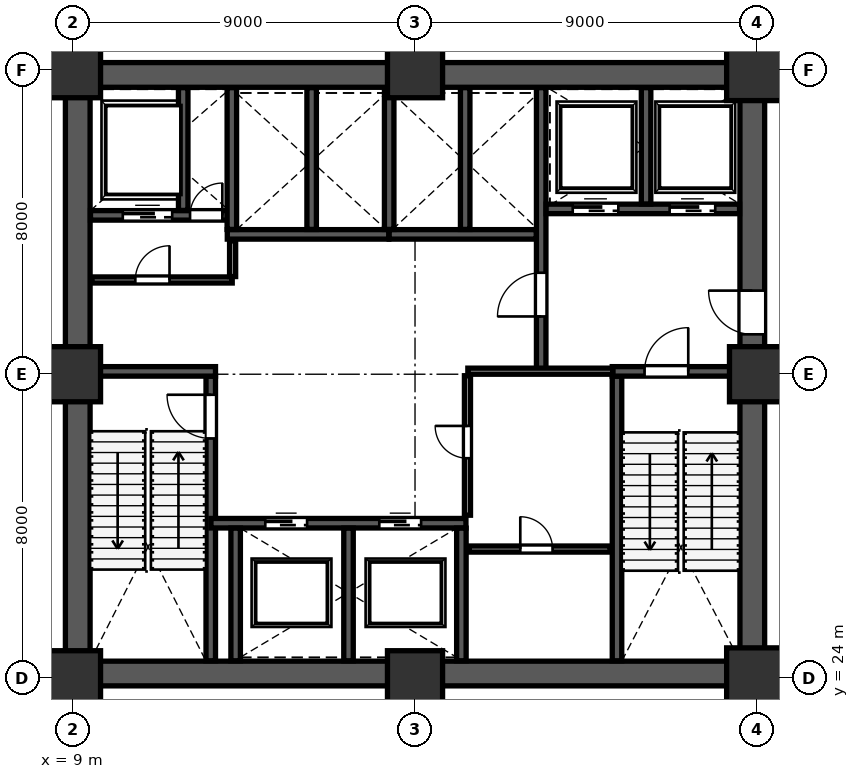
"""IFC4 building model, lengths in metres.
Left out: names, types, materials, properties, quantities, classifications, styles, units other than length and angle.
Written with IfcOpenShell. Run it as: python <this file> out.ifc"""

import sys

from ifc_helpers import new_model, si_unit, direction, frame, frame_2d, origin, origin_2d, place, context, subcontext, project, spatial, rectangle, extrude, source, transform, mapped, element, fill, save


model = new_model("IFC4")
c1 = context("Model", 3, precision=1e-05, world=origin(), true_north=direction((0.0, 1.0)))
c2 = subcontext(c1, "Body", "Model", "MODEL_VIEW")
j1 = project(units=[si_unit("LENGTHUNIT", "METRE"), si_unit("PLANEANGLEUNIT", "RADIAN")], contexts=[c1])
p1 = place(None, origin())
s1 = spatial("IfcSite", under=j1, at=p1, CompositionType="ELEMENT")
p2 = place(p1, origin())
s2 = spatial("IfcBuilding", under=s1, at=p2, CompositionType="ELEMENT")
p3 = place(p2, frame((0.0, 0.0, 17.4)))
s3 = spatial("IfcBuildingStorey", under=s2, at=p3, CompositionType="ELEMENT", Elevation=17.4)
m1 = source(origin(), c2, "Body", "SweptSolid", [
    extrude(rectangle(XDim=1.45, YDim=1.45, at=origin_2d()), origin(), (0.0, 0.0, 1.0), 4.799),
])
p4 = place(p3, frame((9.0, 24.0, 0.001), z_axis=(0.0, 0.0, 1.0), x_axis=(1.0, 0.0, 0.0)))
e1 = element("IfcColumn", 1, at=p4, inside=s3, PredefinedType="COLUMN", context=c2, shape_type="MappedRepresentation", body=[
    mapped(m1, transform((0.0, 0.0, 0.0), scale=1.0)),
])
m2 = source(origin(), c2, "Body", "SweptSolid", [
    extrude(rectangle(XDim=1.45, YDim=1.45, at=origin_2d()), origin(), (0.0, 0.0, 1.0), 4.799),
])
for number, where, z_axis, x_axis in (
    (2, (9.0, 32.0, 0.001), (0.0, 0.0, 1.0), (1.0, 0.0, 0.0)),
    (3, (9.0, 40.0, 0.001), (0.0, 0.0, 1.0), (1.0, 0.0, 0.0)),
):
    element("IfcColumn", number, at=place(p3, frame(where, z_axis=z_axis, x_axis=x_axis)), inside=s3, PredefinedType="COLUMN", context=c2, shape_type="MappedRepresentation", body=[
        mapped(m2, transform((0.0, 0.0, 0.0), scale=1.0)),
    ])
p5 = place(p3, frame((18.0, 24.0, 0.001), z_axis=(0.0, 0.0, 1.0), x_axis=(1.0, 0.0, 0.0)))
e4 = element("IfcColumn", 4, at=p5, inside=s3, PredefinedType="COLUMN", context=c2, shape_type="MappedRepresentation", body=[
    mapped(m1, transform((0.0, 0.0, 0.0), scale=1.0)),
])
p6 = place(p3, frame((18.0, 40.0, 0.001), z_axis=(0.0, 0.0, 1.0), x_axis=(1.0, 0.0, 0.0)))
e5 = element("IfcColumn", 5, at=p6, inside=s3, PredefinedType="COLUMN", context=c2, shape_type="MappedRepresentation", body=[
    mapped(m2, transform((0.0, 0.0, 0.0), scale=1.0)),
])
m3 = source(origin(), c2, "Body", "SweptSolid", [
    extrude(rectangle(XDim=1.6, YDim=1.6, at=origin_2d()), origin(), (0.0, 0.0, 1.0), 4.799),
])
p7 = place(p3, frame((27.0, 24.0, 0.001), z_axis=(0.0, 0.0, 1.0), x_axis=(1.0, 0.0, 0.0)))
e6 = element("IfcColumn", 6, at=p7, inside=s3, PredefinedType="COLUMN", context=c2, shape_type="MappedRepresentation", body=[
    mapped(m3, transform((0.0, 0.0, 0.0), scale=1.0)),
])
p8 = place(p3, frame((27.0, 32.0, 0.001), z_axis=(0.0, 0.0, 1.0), x_axis=(1.0, 0.0, 0.0)))
e7 = element("IfcColumn", 7, at=p8, inside=s3, PredefinedType="COLUMN", context=c2, shape_type="MappedRepresentation", body=[
    mapped(m2, transform((0.0, 0.0, 0.0), scale=1.0)),
])
m4 = source(origin(), c2, "Body", "SweptSolid", [
    extrude(rectangle(XDim=1.6, YDim=1.6, at=origin_2d()), origin(), (0.0, 0.0, 1.0), 4.799),
])
p9 = place(p3, frame((27.0, 40.0, 0.001), z_axis=(0.0, 0.0, 1.0), x_axis=(1.0, 0.0, 0.0)))
e8 = element("IfcColumn", 8, at=p9, inside=s3, PredefinedType="COLUMN", context=c2, shape_type="MappedRepresentation", body=[
    mapped(m4, transform((0.0, 0.0, 0.0), scale=1.0)),
])
p10 = place(p3, frame((9.125, 24.45, 0.0), z_axis=(0.0, 0.0, 1.0), x_axis=(0.0, 1.0, 0.0)))
e9 = element("IfcWall", 9, at=p10, inside=s3, PredefinedType="SHEAR", context=c2, shape_type="SweptSolid", body=[
    extrude(rectangle(XDim=15.1, YDim=0.65, at=frame_2d((7.55, 0.0))), origin(), (0.0, 0.0, 1.0), 4.54),
])
p11 = place(p3, frame((26.875, 24.45, 0.0), z_axis=(0.0, 0.0, 1.0), x_axis=(0.0, 1.0, 0.0)))
e10 = element("IfcWall", 10, at=p11, inside=s3, PredefinedType="SHEAR", context=c2, shape_type="SweptSolid", body=[
    extrude(rectangle(XDim=15.1, YDim=0.65, at=frame_2d((7.55, 0.0))), origin(), (0.0, 0.0, 1.0), 4.54),
])
p12 = place(p11, frame((8.6, 0.0, 0.0)))
e11 = element("IfcOpeningElement", 11, at=p12, cuts=e10, PredefinedType="OPENING", context=c2, shape_type="SweptSolid", body=[
    extrude(rectangle(XDim=1.15, YDim=2.2, at=frame_2d((0.575, 1.1))), frame((0.0, 0.335, 0.0), z_axis=(0.0, -1.0, 0.0), x_axis=(1.0, 0.0, 0.0)), (0.0, 0.0, 1.0), 0.67),
])
for number, where, z_axis, x_axis in (
    (12, (8.8, 24.125, 0.0), (0.0, 0.0, 1.0), (1.0, 0.0, 0.0)),
    (13, (8.8, 39.875, 0.0), (0.0, 0.0, 1.0), (1.0, 0.0, 0.0)),
):
    element("IfcWall", number, at=place(p3, frame(where, z_axis=z_axis, x_axis=x_axis)), inside=s3, PredefinedType="SHEAR", context=c2, shape_type="SweptSolid", body=[
        extrude(rectangle(XDim=18.4, YDim=0.65, at=frame_2d((9.2, 0.0))), origin(), (0.0, 0.0, 1.0), 4.54),
    ])
p13 = place(p3, frame((12.625, 24.46, 0.0), z_axis=(0.0, 0.0, 1.0), x_axis=(0.0, 1.0, 0.0)))
e14 = element("IfcWall", 14, at=p13, inside=s3, PredefinedType="SHEAR", context=c2, shape_type="SweptSolid", body=[
    extrude(rectangle(XDim=7.49, YDim=0.25, at=frame_2d((3.745, 0.0))), origin(), (0.0, 0.0, 1.0), 4.54),
])
p14 = place(p13, frame((5.85, 0.0, 0.0)))
e15 = element("IfcOpeningElement", 15, at=p14, cuts=e14, PredefinedType="OPENING", context=c2, shape_type="SweptSolid", body=[
    extrude(rectangle(XDim=1.15, YDim=2.2, at=frame_2d((0.575, 1.1))), frame((0.0, 0.135, 0.0), z_axis=(0.0, -1.0, 0.0), x_axis=(1.0, 0.0, 0.0)), (0.0, 0.0, 1.0), 0.27),
])
p15 = place(p3, frame((9.46, 32.075, 0.0), z_axis=(0.0, 0.0, 1.0), x_axis=(1.0, 0.0, 0.0)))
e16 = element("IfcWall", 16, at=p15, inside=s3, PredefinedType="SHEAR", context=c2, shape_type="SweptSolid", body=[
    extrude(rectangle(XDim=3.29, YDim=0.25, at=frame_2d((1.645, 0.0))), origin(), (0.0, 0.0, 1.0), 4.54),
])
p16 = place(p3, frame((23.315, 24.46, 0.0), z_axis=(0.0, 0.0, 1.0), x_axis=(0.0, 1.0, 0.0)))
e17 = element("IfcWall", 17, at=p16, inside=s3, PredefinedType="SHEAR", context=c2, shape_type="SweptSolid", body=[
    extrude(rectangle(XDim=7.49, YDim=0.25, at=frame_2d((3.745, 0.0))), origin(), (0.0, 0.0, 1.0), 4.54),
])
p17 = place(p3, frame((23.19, 32.075, 0.0), z_axis=(0.0, 0.0, 1.0), x_axis=(1.0, 0.0, 0.0)))
e18 = element("IfcWall", 18, at=p17, inside=s3, PredefinedType="SHEAR", context=c2, shape_type="SweptSolid", body=[
    extrude(rectangle(XDim=3.35, YDim=0.25, at=frame_2d((1.675, 0.0))), origin(), (0.0, 0.0, 1.0), 4.54),
])
p18 = place(p17, frame((0.85, 0.0, 0.0)))
e19 = element("IfcOpeningElement", 19, at=p18, cuts=e18, PredefinedType="OPENING", context=c2, shape_type="SweptSolid", body=[
    extrude(rectangle(XDim=1.15, YDim=2.2, at=frame_2d((0.575, 1.1))), frame((0.0, 0.135, 0.0), z_axis=(0.0, -1.0, 0.0), x_axis=(1.0, 0.0, 0.0)), (0.0, 0.0, 1.0), 0.27),
])
p19 = place(p3, frame((21.32, 32.12, 0.0), z_axis=(0.0, 0.0, 1.0), x_axis=(0.0, 1.0, 0.0)))
e20 = element("IfcWall", 20, at=p19, inside=s3, PredefinedType="SHEAR", context=c2, shape_type="SweptSolid", body=[
    extrude(rectangle(XDim=7.42, YDim=0.25, at=frame_2d((3.71, 0.0))), origin(), (0.0, 0.0, 1.0), 4.54),
])
p20 = place(p19, frame((1.4, 0.0, 0.0)))
e21 = element("IfcOpeningElement", 21, at=p20, cuts=e20, PredefinedType="OPENING", context=c2, shape_type="SweptSolid", body=[
    extrude(rectangle(XDim=1.15, YDim=2.2, at=frame_2d((0.575, 1.1))), frame((0.0, 0.135, 0.0), z_axis=(0.0, -1.0, 0.0), x_axis=(1.0, 0.0, 0.0)), (0.0, 0.0, 1.0), 0.27),
])
p21 = place(p3, frame((9.46, 36.18, 0.0), z_axis=(0.0, 0.0, 1.0), x_axis=(1.0, 0.0, 0.0)))
e22 = element("IfcWall", 22, at=p21, inside=s3, PredefinedType="SHEAR", context=c2, shape_type="SweptSolid", body=[
    extrude(rectangle(XDim=3.79, YDim=0.25, at=frame_2d((1.895, 0.0))), origin(), (0.0, 0.0, 1.0), 4.54),
])
p22 = place(p21, frame((2.62, 0.0, 0.0)))
e23 = element("IfcOpeningElement", 23, at=p22, cuts=e22, PredefinedType="OPENING", context=c2, shape_type="SweptSolid", body=[
    extrude(rectangle(XDim=0.85, YDim=2.1, at=frame_2d((0.425, 1.05))), frame((0.0, 0.135, 0.0), z_axis=(0.0, -1.0, 0.0), x_axis=(1.0, 0.0, 0.0)), (0.0, 0.0, 1.0), 0.27),
])
p23 = place(p21, frame((0.85, 0.0, 0.0)))
e24 = element("IfcOpeningElement", 24, at=p23, cuts=e22, PredefinedType="OPENING", context=c2, shape_type="SweptSolid", body=[
    extrude(rectangle(XDim=1.3, YDim=2.25, at=frame_2d((0.65, 1.125))), frame((0.0, 0.135, 0.0), z_axis=(0.0, -1.0, 0.0), x_axis=(1.0, 0.0, 0.0)), (0.0, 0.0, 1.0), 0.27),
])
p24 = place(p3, frame((11.9, 36.31, 0.0), z_axis=(0.0, 0.0, 1.0), x_axis=(0.0, 1.0, 0.0)))
e25 = element("IfcWall", 25, at=p24, inside=s3, PredefinedType="SHEAR", context=c2, shape_type="SweptSolid", body=[
    extrude(rectangle(XDim=3.23, YDim=0.25, at=frame_2d((1.615, 0.0))), origin(), (0.0, 0.0, 1.0), 4.54),
])
p25 = place(p3, frame((21.45, 36.35, 0.0), z_axis=(0.0, 0.0, 1.0), x_axis=(1.0, 0.0, 0.0)))
e26 = element("IfcWall", 26, at=p25, inside=s3, PredefinedType="SHEAR", context=c2, shape_type="SweptSolid", body=[
    extrude(rectangle(XDim=5.09, YDim=0.25, at=frame_2d((2.545, 0.0))), origin(), (0.0, 0.0, 1.0), 4.54),
])
p26 = place(p25, frame((0.7, 0.0, 0.0)))
e27 = element("IfcOpeningElement", 27, at=p26, cuts=e26, PredefinedType="OPENING", context=c2, shape_type="SweptSolid", body=[
    extrude(rectangle(XDim=1.2, YDim=2.2, at=frame_2d((0.6, 1.1))), frame((0.0, 0.135, 0.0), z_axis=(0.0, -1.0, 0.0), x_axis=(1.0, 0.0, 0.0)), (0.0, 0.0, 1.0), 0.27),
])
p27 = place(p25, frame((3.25, 0.0, 0.0)))
e28 = element("IfcOpeningElement", 28, at=p27, cuts=e26, PredefinedType="OPENING", context=c2, shape_type="SweptSolid", body=[
    extrude(rectangle(XDim=1.2, YDim=2.2, at=frame_2d((0.6, 1.1))), frame((0.0, 0.135, 0.0), z_axis=(0.0, -1.0, 0.0), x_axis=(1.0, 0.0, 0.0)), (0.0, 0.0, 1.0), 0.27),
])
p28 = place(p3, frame((24.08, 36.48, 0.0), z_axis=(0.0, 0.0, 1.0), x_axis=(0.0, 1.0, 0.0)))
e29 = element("IfcWall", 29, at=p28, inside=s3, PredefinedType="SHEAR", context=c2, shape_type="SweptSolid", body=[
    extrude(rectangle(XDim=3.06, YDim=0.25, at=frame_2d((1.53, 0.0))), origin(), (0.0, 0.0, 1.0), 4.54),
])
p29 = place(p3, frame((12.63, 28.08, 0.0), z_axis=(0.0, 0.0, 1.0), x_axis=(1.0, 0.0, 0.0)))
e30 = element("IfcWall", 30, at=p29, inside=s3, PredefinedType="SHEAR", context=c2, shape_type="SweptSolid", body=[
    extrude(rectangle(XDim=6.71, YDim=0.25, at=frame_2d((3.355, 0.0))), origin(), (0.0, 0.0, 1.0), 4.54),
])
p30 = place(p29, frame((1.43, 0.0, 0.0)))
e31 = element("IfcOpeningElement", 31, at=p30, cuts=e30, PredefinedType="OPENING", context=c2, shape_type="SweptSolid", body=[
    extrude(rectangle(XDim=1.1, YDim=2.2, at=frame_2d((0.55, 1.1))), frame((0.0, 0.135, 0.0), z_axis=(0.0, -1.0, 0.0), x_axis=(1.0, 0.0, 0.0)), (0.0, 0.0, 1.0), 0.27),
])
p31 = place(p29, frame((4.43, 0.0, 0.0)))
e32 = element("IfcOpeningElement", 32, at=p31, cuts=e30, PredefinedType="OPENING", context=c2, shape_type="SweptSolid", body=[
    extrude(rectangle(XDim=1.1, YDim=2.2, at=frame_2d((0.55, 1.1))), frame((0.0, 0.135, 0.0), z_axis=(0.0, -1.0, 0.0), x_axis=(1.0, 0.0, 0.0)), (0.0, 0.0, 1.0), 0.27),
])
for number, where, z_axis, x_axis in (
    (33, (13.28, 24.46, 0.0), (0.0, 0.0, 1.0), (0.0, 1.0, 0.0)),
    (34, (16.25, 24.46, 0.0), (0.0, 0.0, 1.0), (0.0, 1.0, 0.0)),
    (35, (19.22, 24.46, 0.0), (0.0, 0.0, 1.0), (0.0, 1.0, 0.0)),
):
    element("IfcWall", number, at=place(p3, frame(where, z_axis=z_axis, x_axis=x_axis)), inside=s3, PredefinedType="SHEAR", context=c2, shape_type="SweptSolid", body=[
        extrude(rectangle(XDim=3.49, YDim=0.25, at=frame_2d((1.745, 0.0))), origin(), (0.0, 0.0, 1.0), 4.54),
    ])
p32 = place(p3, frame((13.06, 35.68, 0.0), z_axis=(0.0, 0.0, 1.0), x_axis=(1.0, 0.0, 0.0)))
e36 = element("IfcWall", 36, at=p32, inside=s3, PredefinedType="SHEAR", context=c2, shape_type="SweptSolid", body=[
    extrude(rectangle(XDim=4.25, YDim=0.25, at=frame_2d((2.125, 0.0))), origin(), (0.0, 0.0, 1.0), 4.54),
])
for number, where, z_axis, x_axis in (
    (37, (13.18, 35.81, 0.0), (0.0, 0.0, 1.0), (0.0, 1.0, 0.0)),
    (38, (15.28, 35.81, 0.0), (0.0, 0.0, 1.0), (0.0, 1.0, 0.0)),
):
    element("IfcWall", number, at=place(p3, frame(where, z_axis=z_axis, x_axis=x_axis)), inside=s3, PredefinedType="SHEAR", context=c2, shape_type="SweptSolid", body=[
        extrude(rectangle(XDim=3.73, YDim=0.25, at=frame_2d((1.865, 0.0))), origin(), (0.0, 0.0, 1.0), 4.54),
    ])
p33 = place(p3, frame((17.32, 35.68, 0.0), z_axis=(0.0, 0.0, 1.0), x_axis=(1.0, 0.0, 0.0)))
e39 = element("IfcWall", 39, at=p33, inside=s3, PredefinedType="SHEAR", context=c2, shape_type="SweptSolid", body=[
    extrude(rectangle(XDim=3.87, YDim=0.25, at=frame_2d((1.935, 0.0))), origin(), (0.0, 0.0, 1.0), 4.54),
])
for number, where, z_axis, x_axis in (
    (40, (17.32, 35.81, 0.0), (0.0, 0.0, 1.0), (0.0, 1.0, 0.0)),
    (41, (19.32, 35.81, 0.0), (0.0, 0.0, 1.0), (0.0, 1.0, 0.0)),
):
    element("IfcWall", number, at=place(p3, frame(where, z_axis=z_axis, x_axis=x_axis)), inside=s3, PredefinedType="SHEAR", context=c2, shape_type="SweptSolid", body=[
        extrude(rectangle(XDim=3.73, YDim=0.25, at=frame_2d((1.865, 0.0))), origin(), (0.0, 0.0, 1.0), 4.54),
    ])
p34 = place(p3, frame((9.49, 34.48, 0.0), z_axis=(0.0, 0.0, 1.0), x_axis=(1.0, 0.0, 0.0)))
e42 = element("IfcWall", 42, at=p34, inside=s3, PredefinedType="PARTITIONING", context=c2, shape_type="SweptSolid", body=[
    extrude(rectangle(XDim=3.7, YDim=0.16, at=frame_2d((1.85, 0.0))), origin(), (0.0, 0.0, 1.0), 4.54),
])
p35 = place(p34, frame((1.15, 0.0, 0.0)))
e43 = element("IfcOpeningElement", 43, at=p35, cuts=e42, PredefinedType="OPENING", context=c2, shape_type="SweptSolid", body=[
    extrude(rectangle(XDim=0.9, YDim=2.15, at=frame_2d((0.45, 1.075))), frame((0.0, 0.09, 0.0), z_axis=(0.0, -1.0, 0.0), x_axis=(1.0, 0.0, 0.0)), (0.0, 0.0, 1.0), 0.18),
])
p36 = place(p3, frame((13.2, 34.57, 0.0), z_axis=(0.0, 0.0, 1.0), x_axis=(0.0, 1.0, 0.0)))
e44 = element("IfcWall", 44, at=p36, inside=s3, PredefinedType="PARTITIONING", context=c2, shape_type="SweptSolid", body=[
    extrude(rectangle(XDim=0.94, YDim=0.16, at=frame_2d((0.47, 0.0))), origin(), (0.0, 0.0, 1.0), 4.54),
])
p37 = place(p3, frame((19.39, 32.08, 0.0), z_axis=(0.0, 0.0, 1.0), x_axis=(1.0, 0.0, 0.0)))
e45 = element("IfcWall", 45, at=p37, inside=s3, PredefinedType="PARTITIONING", context=c2, shape_type="SweptSolid", body=[
    extrude(rectangle(XDim=3.82, YDim=0.16, at=frame_2d((1.91, 0.0))), origin(), (0.0, 0.0, 1.0), 4.54),
])
p38 = place(p3, frame((19.38, 28.29, 0.0), z_axis=(0.0, 0.0, 1.0), x_axis=(0.0, 1.0, 0.0)))
e46 = element("IfcWall", 46, at=p38, inside=s3, PredefinedType="PARTITIONING", context=c2, shape_type="SweptSolid", body=[
    extrude(rectangle(XDim=3.67, YDim=0.16, at=frame_2d((1.835, 0.0))), origin(), (0.0, 0.0, 1.0), 4.54),
])
p39 = place(p38, frame((1.5, 0.0, 0.0)))
e47 = element("IfcOpeningElement", 47, at=p39, cuts=e46, PredefinedType="OPENING", context=c2, shape_type="SweptSolid", body=[
    extrude(rectangle(XDim=0.85, YDim=2.1, at=frame_2d((0.425, 1.05))), frame((0.0, 0.09, 0.0), z_axis=(0.0, -1.0, 0.0), x_axis=(1.0, 0.0, 0.0)), (0.0, 0.0, 1.0), 0.18),
])
p40 = place(p3, frame((19.42, 27.4, 0.0), z_axis=(0.0, 0.0, 1.0), x_axis=(1.0, 0.0, 0.0)))
e48 = element("IfcWall", 48, at=p40, inside=s3, PredefinedType="PARTITIONING", context=c2, shape_type="SweptSolid", body=[
    extrude(rectangle(XDim=3.72, YDim=0.16, at=frame_2d((1.86, 0.0))), origin(), (0.0, 0.0, 1.0), 4.54),
])
p41 = place(p40, frame((1.35, 0.0, 0.0)))
e49 = element("IfcOpeningElement", 49, at=p41, cuts=e48, PredefinedType="OPENING", context=c2, shape_type="SweptSolid", body=[
    extrude(rectangle(XDim=0.85, YDim=2.1, at=frame_2d((0.425, 1.05))), frame((0.0, 0.09, 0.0), z_axis=(0.0, -1.0, 0.0), x_axis=(1.0, 0.0, 0.0)), (0.0, 0.0, 1.0), 0.18),
])
m5 = source(origin(), c2, "Body", "SweptSolid", [
    extrude(rectangle(XDim=1.15, YDim=2.2, at=frame_2d((0.575, 1.1))), frame((0.0, 0.025, 0.0), z_axis=(0.0, -1.0, 0.0), x_axis=(1.0, 0.0, 0.0)), (0.0, 0.0, 1.0), 0.05),
])
p42 = place(p14, origin())
e50 = element("IfcDoor", 50, at=p42, inside=s3, OperationType="SINGLE_SWING_RIGHT", PredefinedType="DOOR", context=c2, shape_type="MappedRepresentation", body=[
    mapped(m5, transform((0.0, 0.0, 0.0), scale=1.0)),
])
fill(e15, e50)
m6 = source(origin(), c2, "Body", "SweptSolid", [
    extrude(rectangle(XDim=1.15, YDim=2.2, at=frame_2d((0.575, 1.1))), frame((0.0, 0.025, 0.0), z_axis=(0.0, -1.0, 0.0), x_axis=(1.0, 0.0, 0.0)), (0.0, 0.0, 1.0), 0.05),
])
p43 = place(p20, origin())
e51 = element("IfcDoor", 51, at=p43, inside=s3, OperationType="SINGLE_SWING_LEFT", PredefinedType="DOOR", context=c2, shape_type="MappedRepresentation", body=[
    mapped(m6, transform((0.0, 0.0, 0.0), scale=1.0)),
])
fill(e21, e51)
p44 = place(p18, origin())
e52 = element("IfcDoor", 52, at=p44, inside=s3, OperationType="SINGLE_SWING_RIGHT", PredefinedType="DOOR", context=c2, shape_type="MappedRepresentation", body=[
    mapped(m5, transform((0.0, 0.0, 0.0), scale=1.0)),
])
fill(e19, e52)
p45 = place(p12, origin())
e53 = element("IfcDoor", 53, at=p45, inside=s3, OperationType="SINGLE_SWING_RIGHT", PredefinedType="DOOR", context=c2, shape_type="MappedRepresentation", body=[
    mapped(m6, transform((0.0, 0.0, 0.0), scale=1.0)),
])
fill(e11, e53)
m7 = source(origin(), c2, "Body", "SweptSolid", [
    extrude(rectangle(XDim=0.85, YDim=2.1, at=frame_2d((0.425, 1.05))), frame((0.0, 0.025, 0.0), z_axis=(0.0, -1.0, 0.0), x_axis=(1.0, 0.0, 0.0)), (0.0, 0.0, 1.0), 0.05),
])
p46 = place(p22, origin())
e54 = element("IfcDoor", 54, at=p46, inside=s3, OperationType="SINGLE_SWING_RIGHT", PredefinedType="DOOR", context=c2, shape_type="MappedRepresentation", body=[
    mapped(m7, transform((0.0, 0.0, 0.0), scale=1.0)),
])
fill(e23, e54)
m8 = source(origin(), c2, "Body", "SweptSolid", [
    extrude(rectangle(XDim=1.1, YDim=2.2, at=frame_2d((0.55, 1.1))), frame((0.0, 0.025, 0.0), z_axis=(0.0, -1.0, 0.0), x_axis=(1.0, 0.0, 0.0)), (0.0, 0.0, 1.0), 0.05),
])
p47 = place(p30, origin())
e55 = element("IfcDoor", 55, at=p47, inside=s3, OperationType="SLIDING_TO_LEFT", PredefinedType="DOOR", context=c2, shape_type="MappedRepresentation", body=[
    mapped(m8, transform((0.0, 0.0, 0.0), scale=1.0)),
])
fill(e31, e55)
p48 = place(p31, origin())
e56 = element("IfcDoor", 56, at=p48, inside=s3, OperationType="SLIDING_TO_RIGHT", PredefinedType="DOOR", context=c2, shape_type="MappedRepresentation", body=[
    mapped(m8, transform((0.0, 0.0, 0.0), scale=1.0)),
])
fill(e32, e56)
m9 = source(origin(), c2, "Body", "SweptSolid", [
    extrude(rectangle(XDim=1.2, YDim=2.2, at=frame_2d((0.6, 1.1))), frame((0.0, 0.025, 0.0), z_axis=(0.0, -1.0, 0.0), x_axis=(1.0, 0.0, 0.0)), (0.0, 0.0, 1.0), 0.05),
])
p49 = place(p26, origin())
e57 = element("IfcDoor", 57, at=p49, inside=s3, OperationType="SLIDING_TO_LEFT", PredefinedType="DOOR", context=c2, shape_type="MappedRepresentation", body=[
    mapped(m9, transform((0.0, 0.0, 0.0), scale=1.0)),
])
fill(e27, e57)
p50 = place(p27, origin())
e58 = element("IfcDoor", 58, at=p50, inside=s3, OperationType="SLIDING_TO_RIGHT", PredefinedType="DOOR", context=c2, shape_type="MappedRepresentation", body=[
    mapped(m9, transform((0.0, 0.0, 0.0), scale=1.0)),
])
fill(e28, e58)
m10 = source(origin(), c2, "Body", "SweptSolid", [
    extrude(rectangle(XDim=1.3, YDim=2.25, at=frame_2d((0.65, 1.125))), frame((0.0, 0.025, 0.0), z_axis=(0.0, -1.0, 0.0), x_axis=(1.0, 0.0, 0.0)), (0.0, 0.0, 1.0), 0.05),
])
p51 = place(p23, origin())
e59 = element("IfcDoor", 59, at=p51, inside=s3, OperationType="SLIDING_TO_LEFT", PredefinedType="DOOR", context=c2, shape_type="MappedRepresentation", body=[
    mapped(m10, transform((0.0, 0.0, 0.0), scale=1.0)),
])
fill(e24, e59)
m11 = source(origin(), c2, "Body", "SweptSolid", [
    extrude(rectangle(XDim=0.9, YDim=2.15, at=frame_2d((0.45, 1.075))), frame((0.0, 0.025, 0.0), z_axis=(0.0, -1.0, 0.0), x_axis=(1.0, 0.0, 0.0)), (0.0, 0.0, 1.0), 0.05),
])
p52 = place(p35, origin())
e60 = element("IfcDoor", 60, at=p52, inside=s3, OperationType="SINGLE_SWING_RIGHT", PredefinedType="DOOR", context=c2, shape_type="MappedRepresentation", body=[
    mapped(m11, transform((0.0, 0.0, 0.0), scale=1.0)),
])
fill(e43, e60)
p53 = place(p41, origin())
e61 = element("IfcDoor", 61, at=p53, inside=s3, OperationType="SINGLE_SWING_LEFT", PredefinedType="DOOR", context=c2, shape_type="MappedRepresentation", body=[
    mapped(m7, transform((0.0, 0.0, 0.0), scale=1.0)),
])
fill(e49, e61)
p54 = place(p39, origin())
e62 = element("IfcDoor", 62, at=p54, inside=s3, OperationType="SINGLE_SWING_RIGHT", PredefinedType="DOOR", context=c2, shape_type="MappedRepresentation", body=[
    mapped(m7, transform((0.0, 0.0, 0.0), scale=1.0)),
])
fill(e47, e62)
save(model, sys.argv[1])
